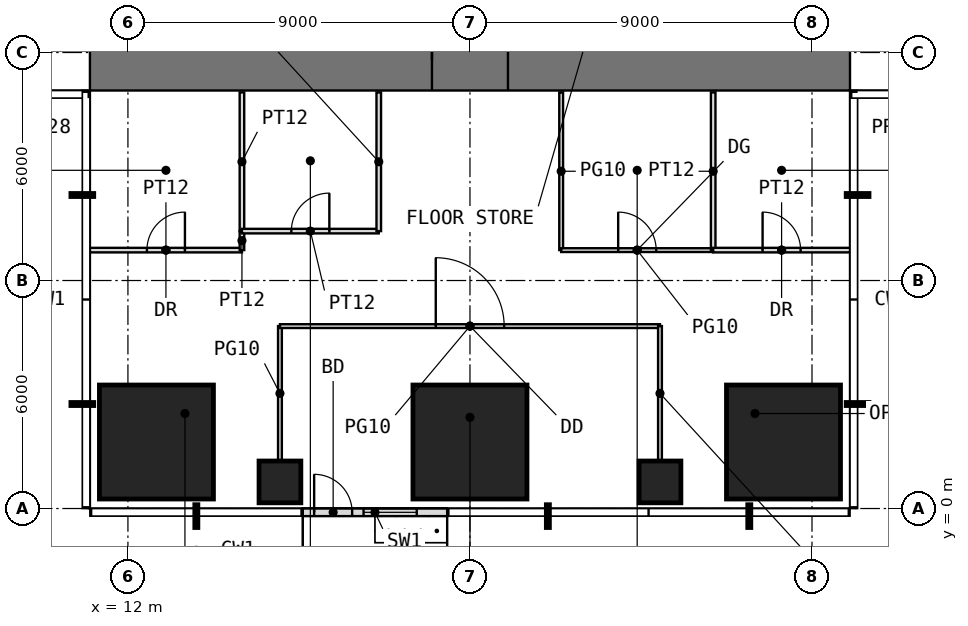
"""IFC4 building model, lengths in metres.
Left out: names, types, materials, properties, quantities, classifications, styles, units other than length and angle.
Written with IfcOpenShell. Run it as: python <this file> out.ifc"""

import sys

from ifc_helpers import new_model, si_unit, direction, frame, frame_2d, origin, origin_2d, place, context, subcontext, project, spatial, rectangle, extrude, element, fill, save


model = new_model("IFC4")
c1 = context("Model", 3, precision=1e-05, world=origin(), true_north=direction((0.0, 1.0)))
c2 = subcontext(c1, "Body", "Model", "MODEL_VIEW")
j1 = project(units=[si_unit("LENGTHUNIT", "METRE"), si_unit("PLANEANGLEUNIT", "RADIAN")], contexts=[c1])
p1 = place(None, origin())
s1 = spatial("IfcSite", under=j1, at=p1, CompositionType="ELEMENT")
p2 = place(p1, origin())
s2 = spatial("IfcBuilding", under=s1, at=p2, CompositionType="ELEMENT")
p3 = place(p2, frame((0.0, 0.0, 148.5)))
s3 = spatial("IfcBuildingStorey", under=s2, at=p3, CompositionType="ELEMENT", Elevation=148.5)
p4 = place(p3, frame((12.75, 1.75, 0.0), z_axis=(0.0, 0.0, 1.0), x_axis=(1.0, 0.0, 0.0)))
e1 = element("IfcColumn", 1, at=p4, inside=s3, PredefinedType="COLUMN", context=c2, shape_type="SweptSolid", body=[
    extrude(rectangle(XDim=3.0, YDim=3.0, at=origin_2d()), origin(), (0.0, 0.0, 1.0), 4.0),
])
p5 = place(p3, frame((16.0, 0.7, 0.0), z_axis=(0.0, 0.0, 1.0), x_axis=(1.0, 0.0, 0.0)))
e2 = element("IfcColumn", 2, at=p5, inside=s3, PredefinedType="COLUMN", context=c2, shape_type="SweptSolid", body=[
    extrude(rectangle(XDim=1.1, YDim=1.1, at=origin_2d()), origin(), (0.0, 0.0, 1.0), 4.0),
])
p6 = place(p3, frame((21.0, 1.75, 0.0), z_axis=(0.0, 0.0, 1.0), x_axis=(1.0, 0.0, 0.0)))
e3 = element("IfcColumn", 3, at=p6, inside=s3, PredefinedType="COLUMN", context=c2, shape_type="SweptSolid", body=[
    extrude(rectangle(XDim=3.0, YDim=3.0, at=origin_2d()), origin(), (0.0, 0.0, 1.0), 4.0),
])
p7 = place(p3, frame((26.0, 0.7, 0.0), z_axis=(0.0, 0.0, 1.0), x_axis=(1.0, 0.0, 0.0)))
e4 = element("IfcColumn", 4, at=p7, inside=s3, PredefinedType="COLUMN", context=c2, shape_type="SweptSolid", body=[
    extrude(rectangle(XDim=1.1, YDim=1.1, at=origin_2d()), origin(), (0.0, 0.0, 1.0), 4.0),
])
p8 = place(p3, frame((29.25, 1.75, 0.0), z_axis=(0.0, 0.0, 1.0), x_axis=(1.0, 0.0, 0.0)))
e5 = element("IfcColumn", 5, at=p8, inside=s3, PredefinedType="COLUMN", context=c2, shape_type="SweptSolid", body=[
    extrude(rectangle(XDim=3.0, YDim=3.0, at=origin_2d()), origin(), (0.0, 0.0, 1.0), 4.0),
])
p9 = place(p3, frame((16.6, -0.1, 0.0), z_axis=(0.0, 0.0, 1.0), x_axis=(1.0, 0.0, 0.0)))
e6 = element("IfcWall", 6, at=p9, inside=s3, PredefinedType="USERDEFINED", context=c2, shape_type="SweptSolid", body=[
    extrude(rectangle(XDim=3.8, YDim=0.2, at=frame_2d((1.9, 0.0))), origin(), (0.0, 0.0, 1.0), 3.75),
])
p10 = place(p9, frame((0.3, 0.0, 0.0)))
e7 = element("IfcOpeningElement", 7, at=p10, cuts=e6, PredefinedType="OPENING", context=c2, shape_type="SweptSolid", body=[
    extrude(rectangle(XDim=1.0, YDim=2.4, at=frame_2d((0.5, 1.2))), frame((0.0, 0.11, 0.0), z_axis=(0.0, -1.0, 0.0), x_axis=(1.0, 0.0, 0.0)), (0.0, 0.0, 1.0), 0.22),
])
p11 = place(p9, frame((1.6, 0.0, 0.3)))
e8 = element("IfcOpeningElement", 8, at=p11, cuts=e6, PredefinedType="OPENING", context=c2, shape_type="SweptSolid", body=[
    extrude(rectangle(XDim=1.4, YDim=2.7, at=frame_2d((0.7, 1.35))), frame((0.0, 0.11, 0.0), z_axis=(0.0, -1.0, 0.0), x_axis=(1.0, 0.0, 0.0)), (0.0, 0.0, 1.0), 0.22),
])
p12 = place(p3, frame((11.0, 11.8, -0.05), z_axis=(0.0, 0.0, 1.0), x_axis=(1.0, 0.0, 0.0)))
e9 = element("IfcWall", 9, at=p12, inside=s3, PredefinedType="SHEAR", context=c2, shape_type="SweptSolid", body=[
    extrude(rectangle(XDim=20.0, YDim=1.6, at=frame_2d((10.0, 0.0))), origin(), (0.0, 0.0, 1.0), 4.0),
])
p13 = place(p12, frame((9.0, 0.0, 0.05)))
e10 = element("IfcOpeningElement", 10, at=p13, cuts=e9, PredefinedType="OPENING", context=c2, shape_type="SweptSolid", body=[
    extrude(rectangle(XDim=2.0, YDim=2.2, at=frame_2d((1.0, 1.1))), frame((0.0, 0.81, 0.0), z_axis=(0.0, -1.0, 0.0), x_axis=(1.0, 0.0, 0.0)), (0.0, 0.0, 1.0), 1.62),
])
p14 = place(p3, frame((11.0, 6.8, 0.0), z_axis=(0.0, 0.0, 1.0), x_axis=(1.0, 0.0, 0.0)))
e11 = element("IfcWall", 11, at=p14, inside=s3, PredefinedType="PARTITIONING", context=c2, shape_type="SweptSolid", body=[
    extrude(rectangle(XDim=4.0, YDim=0.12, at=frame_2d((2.0, 0.0))), origin(), (0.0, 0.0, 1.0), 3.75),
])
p15 = place(p14, frame((1.5, 0.0, 0.0)))
e12 = element("IfcOpeningElement", 12, at=p15, cuts=e11, PredefinedType="OPENING", context=c2, shape_type="SweptSolid", body=[
    extrude(rectangle(XDim=1.0, YDim=2.2, at=frame_2d((0.5, 1.1))), frame((0.0, 0.07, 0.0), z_axis=(0.0, -1.0, 0.0), x_axis=(1.0, 0.0, 0.0)), (0.0, 0.0, 1.0), 0.14),
])
p16 = place(p3, frame((15.0, 6.8, 0.0), z_axis=(0.0, 0.0, 1.0), x_axis=(0.0, 1.0, 0.0)))
e13 = element("IfcWall", 13, at=p16, inside=s3, PredefinedType="PARTITIONING", context=c2, shape_type="SweptSolid", body=[
    extrude(rectangle(XDim=0.5, YDim=0.12, at=frame_2d((0.25, 0.0))), origin(), (0.0, 0.0, 1.0), 3.75),
])
p17 = place(p3, frame((15.0, 7.3, 0.0), z_axis=(0.0, 0.0, 1.0), x_axis=(0.0, 1.0, 0.0)))
e14 = element("IfcWall", 14, at=p17, inside=s3, PredefinedType="PARTITIONING", context=c2, shape_type="SweptSolid", body=[
    extrude(rectangle(XDim=3.65, YDim=0.12, at=frame_2d((1.825, 0.0))), origin(), (0.0, 0.0, 1.0), 3.75),
])
p18 = place(p3, frame((15.0, 7.3, 0.0), z_axis=(0.0, 0.0, 1.0), x_axis=(1.0, 0.0, 0.0)))
e15 = element("IfcWall", 15, at=p18, inside=s3, PredefinedType="PARTITIONING", context=c2, shape_type="SweptSolid", body=[
    extrude(rectangle(XDim=3.6, YDim=0.12, at=frame_2d((1.8, 0.0))), origin(), (0.0, 0.0, 1.0), 3.75),
])
p19 = place(p18, frame((1.3, 0.0, 0.0)))
e16 = element("IfcOpeningElement", 16, at=p19, cuts=e15, PredefinedType="OPENING", context=c2, shape_type="SweptSolid", body=[
    extrude(rectangle(XDim=1.0, YDim=2.2, at=frame_2d((0.5, 1.1))), frame((0.0, 0.07, 0.0), z_axis=(0.0, -1.0, 0.0), x_axis=(1.0, 0.0, 0.0)), (0.0, 0.0, 1.0), 0.14),
])
p20 = place(p3, frame((16.0, 1.26, 0.0), z_axis=(0.0, 0.0, 1.0), x_axis=(0.0, 1.0, 0.0)))
e17 = element("IfcWall", 17, at=p20, inside=s3, PredefinedType="PARTITIONING", context=c2, shape_type="SweptSolid", body=[
    extrude(rectangle(XDim=3.54, YDim=0.1, at=frame_2d((1.77, 0.0))), origin(), (0.0, 0.0, 1.0), 3.75),
])
p21 = place(p3, frame((16.0, 4.8, 0.0), z_axis=(0.0, 0.0, 1.0), x_axis=(1.0, 0.0, 0.0)))
e18 = element("IfcWall", 18, at=p21, inside=s3, PredefinedType="PARTITIONING", context=c2, shape_type="SweptSolid", body=[
    extrude(rectangle(XDim=10.0, YDim=0.1, at=frame_2d((5.0, 0.0))), origin(), (0.0, 0.0, 1.0), 3.75),
])
p22 = place(p21, frame((4.1, 0.0, 0.0)))
e19 = element("IfcOpeningElement", 19, at=p22, cuts=e18, PredefinedType="OPENING", context=c2, shape_type="SweptSolid", body=[
    extrude(rectangle(XDim=1.8, YDim=2.4, at=frame_2d((0.9, 1.2))), frame((0.0, 0.06, 0.0), z_axis=(0.0, -1.0, 0.0), x_axis=(1.0, 0.0, 0.0)), (0.0, 0.0, 1.0), 0.12),
])
p23 = place(p3, frame((18.6, 7.3, 0.0), z_axis=(0.0, 0.0, 1.0), x_axis=(0.0, 1.0, 0.0)))
e20 = element("IfcWall", 20, at=p23, inside=s3, PredefinedType="PARTITIONING", context=c2, shape_type="SweptSolid", body=[
    extrude(rectangle(XDim=3.65, YDim=0.12, at=frame_2d((1.825, 0.0))), origin(), (0.0, 0.0, 1.0), 3.75),
])
p24 = place(p3, frame((23.4, 6.8, 0.0), z_axis=(0.0, 0.0, 1.0), x_axis=(0.0, 1.0, 0.0)))
e21 = element("IfcWall", 21, at=p24, inside=s3, PredefinedType="PARTITIONING", context=c2, shape_type="SweptSolid", body=[
    extrude(rectangle(XDim=4.15, YDim=0.1, at=frame_2d((2.075, 0.0))), origin(), (0.0, 0.0, 1.0), 3.75),
])
p25 = place(p3, frame((23.4, 6.8, 0.0), z_axis=(0.0, 0.0, 1.0), x_axis=(1.0, 0.0, 0.0)))
e22 = element("IfcWall", 22, at=p25, inside=s3, PredefinedType="PARTITIONING", context=c2, shape_type="SweptSolid", body=[
    extrude(rectangle(XDim=4.0, YDim=0.1, at=frame_2d((2.0, 0.0))), origin(), (0.0, 0.0, 1.0), 3.75),
])
p26 = place(p25, frame((1.5, 0.0, 0.0)))
e23 = element("IfcOpeningElement", 23, at=p26, cuts=e22, PredefinedType="OPENING", context=c2, shape_type="SweptSolid", body=[
    extrude(rectangle(XDim=1.0, YDim=2.4, at=frame_2d((0.5, 1.2))), frame((0.0, 0.06, 0.0), z_axis=(0.0, -1.0, 0.0), x_axis=(1.0, 0.0, 0.0)), (0.0, 0.0, 1.0), 0.12),
])
p27 = place(p3, frame((26.0, 1.26, 0.0), z_axis=(0.0, 0.0, 1.0), x_axis=(0.0, 1.0, 0.0)))
e24 = element("IfcWall", 24, at=p27, inside=s3, PredefinedType="PARTITIONING", context=c2, shape_type="SweptSolid", body=[
    extrude(rectangle(XDim=3.54, YDim=0.1, at=frame_2d((1.77, 0.0))), origin(), (0.0, 0.0, 1.0), 3.75),
])
p28 = place(p3, frame((27.4, 6.8, 0.0), z_axis=(0.0, 0.0, 1.0), x_axis=(0.0, 1.0, 0.0)))
e25 = element("IfcWall", 25, at=p28, inside=s3, PredefinedType="PARTITIONING", context=c2, shape_type="SweptSolid", body=[
    extrude(rectangle(XDim=4.15, YDim=0.12, at=frame_2d((2.075, 0.0))), origin(), (0.0, 0.0, 1.0), 3.75),
])
p29 = place(p3, frame((27.4, 6.8, 0.0), z_axis=(0.0, 0.0, 1.0), x_axis=(1.0, 0.0, 0.0)))
e26 = element("IfcWall", 26, at=p29, inside=s3, PredefinedType="PARTITIONING", context=c2, shape_type="SweptSolid", body=[
    extrude(rectangle(XDim=3.6, YDim=0.12, at=frame_2d((1.8, 0.0))), origin(), (0.0, 0.0, 1.0), 3.75),
])
p30 = place(p29, frame((1.3, 0.0, 0.0)))
e27 = element("IfcOpeningElement", 27, at=p30, cuts=e26, PredefinedType="OPENING", context=c2, shape_type="SweptSolid", body=[
    extrude(rectangle(XDim=1.0, YDim=2.2, at=frame_2d((0.5, 1.1))), frame((0.0, 0.07, 0.0), z_axis=(0.0, -1.0, 0.0), x_axis=(1.0, 0.0, 0.0)), (0.0, 0.0, 1.0), 0.14),
])
p31 = place(p10, origin())
e28 = element("IfcDoor", 28, at=p31, inside=s3, OperationType="SINGLE_SWING_LEFT", PredefinedType="DOOR", context=c2, shape_type="SweptSolid", body=[
    extrude(rectangle(XDim=1.0, YDim=2.4, at=frame_2d((0.5, 1.2))), frame((0.0, 0.025, 0.0), z_axis=(0.0, -1.0, 0.0), x_axis=(1.0, 0.0, 0.0)), (0.0, 0.0, 1.0), 0.05),
])
fill(e7, e28)
p32 = place(p11, origin())
e29 = element("IfcWindow", 29, at=p32, inside=s3, PartitioningType="SINGLE_PANEL", PredefinedType="WINDOW", context=c2, shape_type="SweptSolid", body=[
    extrude(rectangle(XDim=1.4, YDim=2.7, at=frame_2d((0.7, 1.35))), frame((0.0, 0.03, 0.0), z_axis=(0.0, -1.0, 0.0), x_axis=(1.0, 0.0, 0.0)), (0.0, 0.0, 1.0), 0.06),
])
fill(e8, e29)
p33 = place(p13, origin())
e30 = element("IfcDoor", 30, at=p33, inside=s3, OperationType="DOUBLE_DOOR_SINGLE_SWING", PredefinedType="DOOR", context=c2, shape_type="SweptSolid", body=[
    extrude(rectangle(XDim=2.0, YDim=2.2, at=frame_2d((1.0, 1.1))), frame((0.0, 0.025, 0.0), z_axis=(0.0, -1.0, 0.0), x_axis=(1.0, 0.0, 0.0)), (0.0, 0.0, 1.0), 0.05),
])
fill(e10, e30)
p34 = place(p15, origin())
e31 = element("IfcDoor", 31, at=p34, inside=s3, OperationType="SINGLE_SWING_RIGHT", PredefinedType="DOOR", context=c2, shape_type="SweptSolid", body=[
    extrude(rectangle(XDim=1.0, YDim=2.2, at=frame_2d((0.5, 1.1))), frame((0.0, 0.025, 0.0), z_axis=(0.0, -1.0, 0.0), x_axis=(1.0, 0.0, 0.0)), (0.0, 0.0, 1.0), 0.05),
])
fill(e12, e31)
p35 = place(p19, origin())
e32 = element("IfcDoor", 32, at=p35, inside=s3, OperationType="SINGLE_SWING_RIGHT", PredefinedType="DOOR", context=c2, shape_type="SweptSolid", body=[
    extrude(rectangle(XDim=1.0, YDim=2.2, at=frame_2d((0.5, 1.1))), frame((0.0, 0.025, 0.0), z_axis=(0.0, -1.0, 0.0), x_axis=(1.0, 0.0, 0.0)), (0.0, 0.0, 1.0), 0.05),
])
fill(e16, e32)
p36 = place(p26, origin())
e33 = element("IfcDoor", 33, at=p36, inside=s3, OperationType="SINGLE_SWING_LEFT", PredefinedType="DOOR", context=c2, shape_type="SweptSolid", body=[
    extrude(rectangle(XDim=1.0, YDim=2.4, at=frame_2d((0.5, 1.2))), frame((0.0, 0.025, 0.0), z_axis=(0.0, -1.0, 0.0), x_axis=(1.0, 0.0, 0.0)), (0.0, 0.0, 1.0), 0.05),
])
fill(e23, e33)
p37 = place(p30, origin())
e34 = element("IfcDoor", 34, at=p37, inside=s3, OperationType="SINGLE_SWING_LEFT", PredefinedType="DOOR", context=c2, shape_type="SweptSolid", body=[
    extrude(rectangle(XDim=1.0, YDim=2.2, at=frame_2d((0.5, 1.1))), frame((0.0, 0.025, 0.0), z_axis=(0.0, -1.0, 0.0), x_axis=(1.0, 0.0, 0.0)), (0.0, 0.0, 1.0), 0.05),
])
fill(e27, e34)
p38 = place(p22, origin())
e35 = element("IfcDoor", 35, at=p38, inside=s3, OperationType="DOUBLE_DOOR_SINGLE_SWING", PredefinedType="DOOR", context=c2, shape_type="SweptSolid", body=[
    extrude(rectangle(XDim=1.8, YDim=2.4, at=frame_2d((0.9, 1.2))), frame((0.0, 0.025, 0.0), z_axis=(0.0, -1.0, 0.0), x_axis=(1.0, 0.0, 0.0)), (0.0, 0.0, 1.0), 0.05),
])
fill(e19, e35)
save(model, sys.argv[1])
